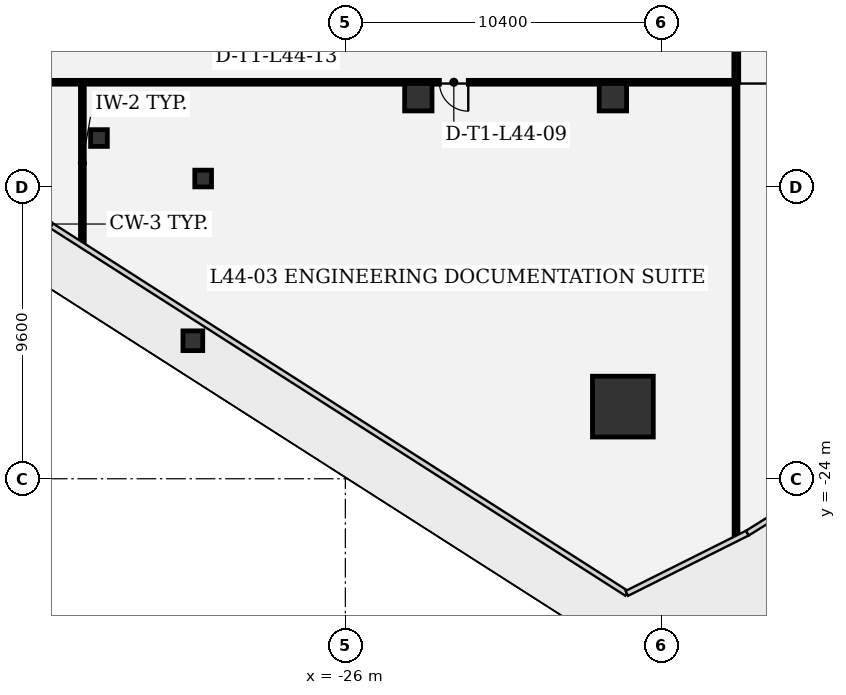
"""IFC4 building model, lengths in metres.
Left out: names, types, materials, properties, quantities, classifications, styles, units other than length and angle.
Written with IfcOpenShell. Run it as: python <this file> out.ifc"""

import sys

from ifc_helpers import new_model, si_unit, direction, frame, frame_2d, origin, origin_2d, place, context, subcontext, project, spatial, rectangle, extrude, element, fill, save


model = new_model("IFC4")
c1 = context("Model", 3, precision=1e-05, world=origin(), true_north=direction((0.0, 1.0)))
c2 = subcontext(c1, "Body", "Model", "MODEL_VIEW")
j1 = project(units=[si_unit("LENGTHUNIT", "METRE"), si_unit("PLANEANGLEUNIT", "RADIAN")], contexts=[c1])
p1 = place(None, origin())
s1 = spatial("IfcSite", under=j1, at=p1, CompositionType="ELEMENT")
p2 = place(p1, origin())
s2 = spatial("IfcBuilding", under=s1, at=p2, CompositionType="ELEMENT")
p3 = place(p2, frame((0.0, 0.0, 192.9)))
s3 = spatial("IfcBuildingStorey", under=s2, at=p3, CompositionType="ELEMENT", Elevation=192.9)
p4 = place(p3, frame((-16.872, -21.627, 0.0), z_axis=(0.0, 0.0, 1.0), x_axis=(1.0, 0.0, 0.0)))
e1 = element("IfcColumn", 1, at=p4, inside=s3, PredefinedType="COLUMN", context=c2, shape_type="SweptSolid", body=[
    extrude(rectangle(XDim=2.0, YDim=2.0, at=origin_2d()), origin(), (0.0, 0.0, 1.0), 4.05),
])
for number, where, z_axis, x_axis in (
    (2, (-17.2, -11.45, 0.0), (0.0, 0.0, 1.0), (1.0, 0.0, 0.0)),
    (3, (-23.6, -11.45, 0.0), (0.0, 0.0, 1.0), (1.0, 0.0, 0.0)),
):
    element("IfcColumn", number, at=place(p3, frame(where, z_axis=z_axis, x_axis=x_axis)), inside=s3, PredefinedType="COLUMN", context=c2, shape_type="SweptSolid", body=[
        extrude(rectangle(XDim=0.9, YDim=0.9, at=origin_2d()), origin(), (0.0, 0.0, 1.0), 4.05),
    ])
p5 = place(p3, frame((-31.016, -19.46, 0.0), z_axis=(0.0, 0.0, 1.0), x_axis=(1.0, 0.0, 0.0)))
e4 = element("IfcColumn", 4, at=p5, inside=s3, PredefinedType="COLUMN", context=c2, shape_type="SweptSolid", body=[
    extrude(rectangle(XDim=0.65, YDim=0.65, at=origin_2d()), origin(), (0.0, 0.0, 1.0), 4.05),
])
for number, where, z_axis, x_axis in (
    (5, (-34.104, -12.792, 0.0), (0.0, 0.0, 1.0), (1.0, 0.0, 0.0)),
    (6, (-30.677, -14.124, 0.0), (0.0, 0.0, 1.0), (1.0, 0.0, 0.0)),
):
    element("IfcColumn", number, at=place(p3, frame(where, z_axis=z_axis, x_axis=x_axis)), inside=s3, PredefinedType="COLUMN", context=c2, shape_type="SweptSolid", body=[
        extrude(rectangle(XDim=0.55, YDim=0.55, at=origin_2d()), origin(), (0.0, 0.0, 1.0), 4.05),
    ])
p6 = place(p3, frame((-34.65, -16.246, 0.0), z_axis=(0.0, 0.0, 1.0), x_axis=(0.0, 1.0, 0.0)))
e7 = element("IfcWall", 7, at=p6, inside=s3, PredefinedType="PARTITIONING", context=c2, shape_type="SweptSolid", body=[
    extrude(rectangle(XDim=5.263, YDim=0.125, at=frame_2d((2.632, 0.0))), origin(), (0.0, 0.0, 1.0), 3.78),
])
p7 = place(p3, frame((-37.833, -10.958, 0.0), z_axis=(0.0, 0.0, 1.0), x_axis=(1.0, 0.0, 0.0)))
e8 = element("IfcWall", 8, at=p7, inside=s3, PredefinedType="PARTITIONING", context=c2, shape_type="SweptSolid", body=[
    extrude(rectangle(XDim=3.158, YDim=0.125, at=frame_2d((1.579, 0.0))), origin(), (0.0, 0.0, 1.0), 2.9),
])
p8 = place(p3, frame((-13.15, -25.895, 0.0), z_axis=(0.0, 0.0, 1.0), x_axis=(0.0, 1.0, 0.0)))
e9 = element("IfcWall", 9, at=p8, inside=s3, PredefinedType="PARTITIONING", context=c2, shape_type="SweptSolid", body=[
    extrude(rectangle(XDim=14.912, YDim=0.125, at=frame_2d((7.456, 0.0))), origin(), (0.0, 0.0, 1.0), 3.78),
])
p9 = place(p3, frame((-13.175, -10.958, 0.0), z_axis=(0.0, 0.0, 1.0), x_axis=(-1.0, 0.0, 0.0)))
e10 = element("IfcWall", 10, at=p9, inside=s3, PredefinedType="PARTITIONING", context=c2, shape_type="SweptSolid", body=[
    extrude(rectangle(XDim=21.442, YDim=0.125, at=frame_2d((10.721, 0.0))), origin(), (0.0, 0.0, 1.0), 2.9),
])
p10 = place(p9, frame((8.782, 0.0, 0.0)))
e11 = element("IfcOpeningElement", 11, at=p10, cuts=e10, PredefinedType="OPENING", context=c2, shape_type="SweptSolid", body=[
    extrude(rectangle(XDim=0.95, YDim=2.15, at=frame_2d((0.475, 1.075))), frame((0.0, 0.073, 0.0), z_axis=(0.0, -1.0, 0.0), x_axis=(1.0, 0.0, 0.0)), (0.0, 0.0, 1.0), 0.145),
])
p11 = place(p3, frame((-13.142, -1.333, 0.0), z_axis=(0.0, 0.0, 1.0), x_axis=(0.0, -1.0, 0.0)))
e12 = element("IfcWall", 12, at=p11, inside=s3, PredefinedType="PARTITIONING", context=c2, shape_type="SweptSolid", body=[
    extrude(rectangle(XDim=9.625, YDim=0.16, at=frame_2d((4.812, 0.0))), origin(), (0.0, 0.0, 1.0), 2.9),
])
p12 = place(p10, origin())
e13 = element("IfcDoor", 13, at=p12, inside=s3, OperationType="SINGLE_SWING_LEFT", PredefinedType="DOOR", context=c2, shape_type="SweptSolid", body=[
    extrude(rectangle(XDim=0.95, YDim=2.15, at=frame_2d((0.475, 1.075))), frame((0.0, 0.025, 0.0), z_axis=(0.0, -1.0, 0.0), x_axis=(1.0, 0.0, 0.0)), (0.0, 0.0, 1.0), 0.05),
])
fill(e11, e13)
save(model, sys.argv[1])
